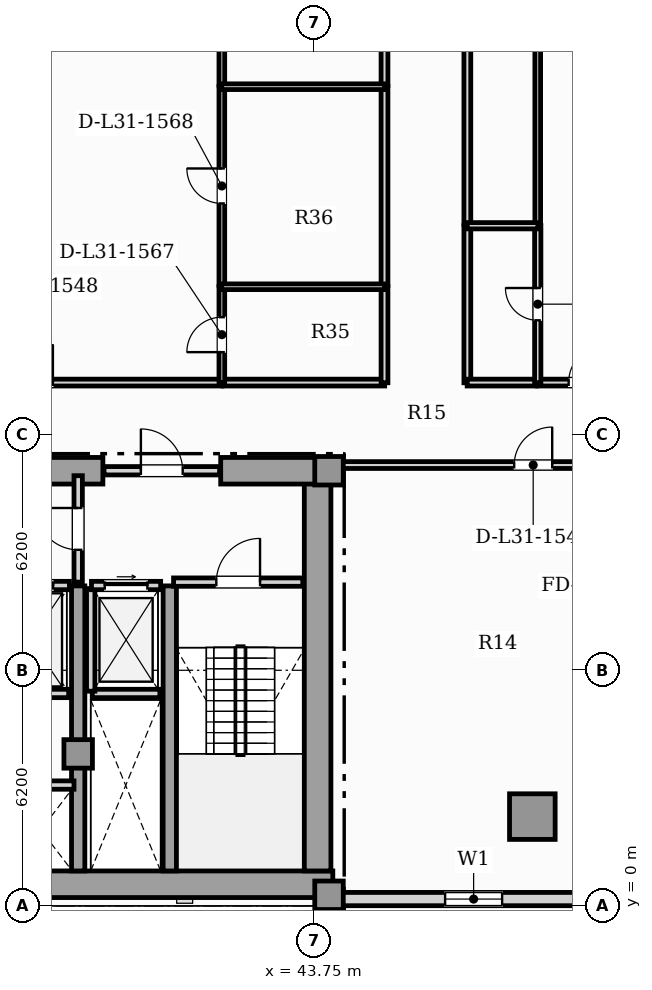
"""IFC4 building model, lengths in metres.
Left out: names, types, materials, properties, quantities, classifications, styles, units other than length and angle.
Written with IfcOpenShell. Run it as: python <this file> out.ifc"""

import sys

from ifc_helpers import new_model, si_unit, direction, frame, frame_2d, origin, origin_2d, place, context, subcontext, project, spatial, rectangle, hollow_rectangle, extrude, element, fill, save


model = new_model("IFC4")
c1 = context("Model", 3, precision=1e-05, world=origin(), true_north=direction((0.0, 1.0)))
c2 = subcontext(c1, "Body", "Model", "MODEL_VIEW")
j1 = project(units=[si_unit("LENGTHUNIT", "METRE"), si_unit("PLANEANGLEUNIT", "RADIAN")], contexts=[c1])
p1 = place(None, origin())
s1 = spatial("IfcSite", under=j1, at=p1, CompositionType="ELEMENT")
p2 = place(p1, origin())
s2 = spatial("IfcBuilding", under=s1, at=p2, CompositionType="ELEMENT")
p3 = place(p2, frame((0.0, 0.0, 127.25)))
s3 = spatial("IfcBuildingStorey", under=s2, at=p3, CompositionType="ELEMENT", Elevation=127.25)
p4 = place(p3, frame((13.25, 0.57, 0.0), z_axis=(0.0, 0.0, 1.0), x_axis=(1.0, 0.0, 0.0)))
e1 = element("IfcWall", 1, at=p4, inside=s3, PredefinedType="SHEAR", context=c2, shape_type="SweptSolid", body=[
    extrude(rectangle(XDim=31.0, YDim=0.7, at=frame_2d((15.5, 0.0))), origin(), (0.0, 0.0, 1.0), 3.6),
])
p5 = place(p3, frame((43.85, 0.92, 0.0), z_axis=(0.0, 0.0, 1.0), x_axis=(0.0, 1.0, 0.0)))
e2 = element("IfcWall", 2, at=p5, inside=s3, PredefinedType="SHEAR", context=c2, shape_type="SweptSolid", body=[
    extrude(rectangle(XDim=10.53, YDim=0.7, at=frame_2d((5.265, 0.0))), origin(), (0.0, 0.0, 1.0), 3.6),
])
p6 = place(p3, frame((30.9, 11.45, 0.0), z_axis=(0.0, 0.0, 1.0), x_axis=(1.0, 0.0, 0.0)))
e3 = element("IfcWall", 3, at=p6, inside=s3, PredefinedType="SHEAR", context=c2, shape_type="SweptSolid", body=[
    extrude(rectangle(XDim=7.3, YDim=0.7, at=frame_2d((3.65, 0.0))), origin(), (0.0, 0.0, 1.0), 3.6),
])
p7 = place(p3, frame((41.3, 11.45, 0.0), z_axis=(0.0, 0.0, 1.0), x_axis=(1.0, 0.0, 0.0)))
e4 = element("IfcWall", 4, at=p7, inside=s3, PredefinedType="SHEAR", context=c2, shape_type="SweptSolid", body=[
    extrude(rectangle(XDim=2.95, YDim=0.7, at=frame_2d((1.475, 0.0))), origin(), (0.0, 0.0, 1.0), 3.6),
])
for number, where, z_axis, x_axis in (
    (5, (37.55, 0.92, 0.0), (0.0, 0.0, 1.0), (0.0, 1.0, 0.0)),
    (6, (39.96, 0.92, 0.0), (0.0, 0.0, 1.0), (0.0, 1.0, 0.0)),
):
    element("IfcWall", number, at=place(p3, frame(where, z_axis=z_axis, x_axis=x_axis)), inside=s3, PredefinedType="SHEAR", context=c2, shape_type="SweptSolid", body=[
        extrude(rectangle(XDim=7.5, YDim=0.35, at=frame_2d((3.75, 0.0))), origin(), (0.0, 0.0, 1.0), 3.6),
    ])
for number, where, z_axis, x_axis in (
    (7, (44.15, 0.28, 0.0), (0.0, 0.0, 1.0), (1.0, 0.0, 0.0)),
    (8, (44.15, 11.45, 0.0), (0.0, 0.0, 1.0), (1.0, 0.0, 0.0)),
    (9, (37.55, 4.0, 0.0), (0.0, 0.0, 1.0), (1.0, 0.0, 0.0)),
):
    element("IfcColumn", number, at=place(p3, frame(where, z_axis=z_axis, x_axis=x_axis)), inside=s3, PredefinedType="COLUMN", context=c2, shape_type="SweptSolid", body=[
        extrude(rectangle(XDim=0.75, YDim=0.75, at=origin_2d()), origin(), (0.0, 0.0, 1.0), 3.85),
    ])
p8 = place(p3, frame((49.5, 2.35, 0.0), z_axis=(0.0, 0.0, 1.0), x_axis=(1.0, 0.0, 0.0)))
e10 = element("IfcColumn", 10, at=p8, inside=s3, PredefinedType="USERDEFINED", context=c2, shape_type="SweptSolid", body=[
    extrude(hollow_rectangle(XDim=1.2, YDim=1.2, WallThickness=0.07, at=origin_2d()), origin(), (0.0, 0.0, 1.0), 3.85),
])
p9 = place(p3, frame((44.25, 0.18, 0.0), z_axis=(0.0, 0.0, 1.0), x_axis=(1.0, 0.0, 0.0)))
e11 = element("IfcWall", 11, at=p9, inside=s3, PredefinedType="SOLIDWALL", context=c2, shape_type="SweptSolid", body=[
    extrude(rectangle(XDim=7.41, YDim=0.35, at=frame_2d((3.705, 0.0))), origin(), (0.0, 0.0, 1.0), 3.6),
])
p10 = place(p9, frame((2.955, 0.0, 0.9)))
e12 = element("IfcOpeningElement", 12, at=p10, cuts=e11, PredefinedType="OPENING", context=c2, shape_type="SweptSolid", body=[
    extrude(rectangle(XDim=1.5, YDim=1.95, at=frame_2d((0.75, 0.975))), frame((0.0, 0.185, 0.0), z_axis=(0.0, -1.0, 0.0), x_axis=(1.0, 0.0, 0.0)), (0.0, 0.0, 1.0), 0.37),
])
p11 = place(p3, frame((37.92, 5.59, 0.0), z_axis=(0.0, 0.0, 1.0), x_axis=(1.0, 0.0, 0.0)))
e13 = element("IfcWall", 13, at=p11, inside=s3, PredefinedType="SOLIDWALL", context=c2, shape_type="SweptSolid", body=[
    extrude(rectangle(XDim=1.78, YDim=0.22, at=frame_2d((0.89, 0.0))), origin(), (0.0, 0.0, 1.0), 3.6),
])
p12 = place(p3, frame((37.88, 5.65, 0.0), z_axis=(0.0, 0.0, 1.0), x_axis=(0.0, 1.0, 0.0)))
e14 = element("IfcWall", 14, at=p12, inside=s3, PredefinedType="SOLIDWALL", context=c2, shape_type="SweptSolid", body=[
    extrude(rectangle(XDim=2.7, YDim=0.22, at=frame_2d((1.35, 0.0))), origin(), (0.0, 0.0, 1.0), 3.6),
])
p13 = place(p3, frame((37.9, 8.43, 0.0), z_axis=(0.0, 0.0, 1.0), x_axis=(1.0, 0.0, 0.0)))
e15 = element("IfcWall", 15, at=p13, inside=s3, PredefinedType="SOLIDWALL", context=c2, shape_type="SweptSolid", body=[
    extrude(rectangle(XDim=1.82, YDim=0.22, at=frame_2d((0.91, 0.0))), origin(), (0.0, 0.0, 1.0), 3.6),
])
p14 = place(p13, frame((0.35, 0.0, 0.0)))
e16 = element("IfcOpeningElement", 16, at=p14, cuts=e15, PredefinedType="OPENING", context=c2, shape_type="SweptSolid", body=[
    extrude(rectangle(XDim=1.12, YDim=2.25, at=frame_2d((0.56, 1.125))), frame((0.0, 0.12, 0.0), z_axis=(0.0, -1.0, 0.0), x_axis=(1.0, 0.0, 0.0)), (0.0, 0.0, 1.0), 0.24),
])
p15 = place(p3, frame((35.3, 5.59, 0.0), z_axis=(0.0, 0.0, 1.0), x_axis=(1.0, 0.0, 0.0)))
e17 = element("IfcWall", 17, at=p15, inside=s3, PredefinedType="SOLIDWALL", context=c2, shape_type="SweptSolid", body=[
    extrude(rectangle(XDim=2.0, YDim=0.22, at=frame_2d((1.0, 0.0))), origin(), (0.0, 0.0, 1.0), 3.6),
])
p16 = place(p3, frame((35.28, 8.43, 0.0), z_axis=(0.0, 0.0, 1.0), x_axis=(1.0, 0.0, 0.0)))
e18 = element("IfcWall", 18, at=p16, inside=s3, PredefinedType="SOLIDWALL", context=c2, shape_type="SweptSolid", body=[
    extrude(rectangle(XDim=2.04, YDim=0.22, at=frame_2d((1.02, 0.0))), origin(), (0.0, 0.0, 1.0), 3.6),
])
p17 = place(p16, frame((0.43, 0.0, 0.0)))
e19 = element("IfcOpeningElement", 19, at=p17, cuts=e18, PredefinedType="OPENING", context=c2, shape_type="SweptSolid", body=[
    extrude(rectangle(XDim=1.18, YDim=2.2, at=frame_2d((0.59, 1.1))), frame((0.0, 0.12, 0.0), z_axis=(0.0, -1.0, 0.0), x_axis=(1.0, 0.0, 0.0)), (0.0, 0.0, 1.0), 0.24),
])
p18 = place(p3, frame((35.7, 3.18, 0.0), z_axis=(0.0, 0.0, 1.0), x_axis=(1.0, 0.0, 0.0)))
e20 = element("IfcWall", 20, at=p18, inside=s3, PredefinedType="SOLIDWALL", context=c2, shape_type="SweptSolid", body=[
    extrude(rectangle(XDim=1.74, YDim=0.22, at=frame_2d((0.87, 0.0))), origin(), (0.0, 0.0, 1.0), 3.6),
])
p19 = place(p3, frame((40.06, 8.52, 0.0), z_axis=(0.0, 0.0, 1.0), x_axis=(1.0, 0.0, 0.0)))
e21 = element("IfcWall", 21, at=p19, inside=s3, PredefinedType="SOLIDWALL", context=c2, shape_type="SweptSolid", body=[
    extrude(rectangle(XDim=3.4, YDim=0.22, at=frame_2d((1.7, 0.0))), origin(), (0.0, 0.0, 1.0), 3.6),
])
p20 = place(p19, frame((1.125, 0.0, 0.0)))
e22 = element("IfcOpeningElement", 22, at=p20, cuts=e21, PredefinedType="OPENING", context=c2, shape_type="SweptSolid", body=[
    extrude(rectangle(XDim=1.15, YDim=2.2, at=frame_2d((0.575, 1.1))), frame((0.0, 0.12, 0.0), z_axis=(0.0, -1.0, 0.0), x_axis=(1.0, 0.0, 0.0)), (0.0, 0.0, 1.0), 0.24),
])
p21 = place(p3, frame((37.55, 8.52, 0.0), z_axis=(0.0, 0.0, 1.0), x_axis=(0.0, 1.0, 0.0)))
e23 = element("IfcWall", 23, at=p21, inside=s3, PredefinedType="SOLIDWALL", context=c2, shape_type="SweptSolid", body=[
    extrude(rectangle(XDim=2.8, YDim=0.22, at=frame_2d((1.4, 0.0))), origin(), (0.0, 0.0, 1.0), 3.055),
])
p22 = place(p21, frame((0.85, 0.0, 0.0)))
e24 = element("IfcOpeningElement", 24, at=p22, cuts=e23, PredefinedType="OPENING", context=c2, shape_type="SweptSolid", body=[
    extrude(rectangle(XDim=1.1, YDim=2.2, at=frame_2d((0.55, 1.1))), frame((0.0, 0.12, 0.0), z_axis=(0.0, -1.0, 0.0), x_axis=(1.0, 0.0, 0.0)), (0.0, 0.0, 1.0), 0.24),
])
p23 = place(p3, frame((38.23, 11.45, 0.0), z_axis=(0.0, 0.0, 1.0), x_axis=(1.0, 0.0, 0.0)))
e25 = element("IfcWall", 25, at=p23, inside=s3, PredefinedType="SOLIDWALL", context=c2, shape_type="SweptSolid", body=[
    extrude(rectangle(XDim=3.04, YDim=0.22, at=frame_2d((1.52, 0.0))), origin(), (0.0, 0.0, 1.0), 3.6),
])
p24 = place(p23, frame((0.97, 0.0, 0.0)))
e26 = element("IfcOpeningElement", 26, at=p24, cuts=e25, PredefinedType="OPENING", context=c2, shape_type="SweptSolid", body=[
    extrude(rectangle(XDim=1.1, YDim=2.2, at=frame_2d((0.55, 1.1))), frame((0.0, 0.12, 0.0), z_axis=(0.0, -1.0, 0.0), x_axis=(1.0, 0.0, 0.0)), (0.0, 0.0, 1.0), 0.24),
])
p25 = place(p3, frame((44.355, 11.6, 0.0), z_axis=(0.0, 0.0, 1.0), x_axis=(1.0, 0.0, 0.0)))
e27 = element("IfcWall", 27, at=p25, inside=s3, PredefinedType="PARTITIONING", context=c2, shape_type="SweptSolid", body=[
    extrude(rectangle(XDim=10.335, YDim=0.18, at=frame_2d((5.167, 0.0))), origin(), (0.0, 0.0, 1.0), 3.6),
])
p26 = place(p25, frame((4.667, 0.0, 0.0)))
e28 = element("IfcOpeningElement", 28, at=p26, cuts=e27, PredefinedType="OPENING", context=c2, shape_type="SweptSolid", body=[
    extrude(rectangle(XDim=1.0, YDim=2.15, at=frame_2d((0.5, 1.075))), frame((0.0, 0.1, 0.0), z_axis=(0.0, -1.0, 0.0), x_axis=(1.0, 0.0, 0.0)), (0.0, 0.0, 1.0), 0.2),
])
p27 = place(p3, frame((49.637, 13.77, 0.0), z_axis=(0.0, 0.0, 1.0), x_axis=(1.0, 0.0, 0.0)))
e29 = element("IfcWall", 29, at=p27, inside=s3, PredefinedType="PARTITIONING", context=c2, shape_type="SweptSolid", body=[
    extrude(rectangle(XDim=2.636, YDim=0.18, at=frame_2d((1.318, 0.0))), origin(), (0.0, 0.0, 1.0), 3.6),
])
p28 = place(p27, frame((0.818, 0.0, 0.0)))
e30 = element("IfcOpeningElement", 30, at=p28, cuts=e29, PredefinedType="OPENING", context=c2, shape_type="SweptSolid", body=[
    extrude(rectangle(XDim=1.0, YDim=2.15, at=frame_2d((0.5, 1.075))), frame((0.0, 0.1, 0.0), z_axis=(0.0, -1.0, 0.0), x_axis=(1.0, 0.0, 0.0)), (0.0, 0.0, 1.0), 0.2),
])
p29 = place(p3, frame((47.79, 13.765, 0.0), z_axis=(0.0, 0.0, 1.0), x_axis=(0.0, 1.0, 0.0)))
e31 = element("IfcWall", 31, at=p29, inside=s3, PredefinedType="PARTITIONING", context=c2, shape_type="SweptSolid", body=[
    extrude(rectangle(XDim=4.136, YDim=0.18, at=frame_2d((2.068, 0.0))), origin(), (0.0, 0.0, 1.0), 3.6),
])
p30 = place(p3, frame((47.785, 13.77, 0.0), z_axis=(0.0, 0.0, 1.0), x_axis=(1.0, 0.0, 0.0)))
e32 = element("IfcWall", 32, at=p30, inside=s3, PredefinedType="PARTITIONING", context=c2, shape_type="SweptSolid", body=[
    extrude(rectangle(XDim=1.823, YDim=0.18, at=frame_2d((0.911, 0.0))), origin(), (0.0, 0.0, 1.0), 3.6),
])
p31 = place(p3, frame((47.79, 17.931, 0.0), z_axis=(0.0, 0.0, 1.0), x_axis=(0.0, 1.0, 0.0)))
e33 = element("IfcWall", 33, at=p31, inside=s3, PredefinedType="PARTITIONING", context=c2, shape_type="SweptSolid", body=[
    extrude(rectangle(XDim=9.964, YDim=0.18, at=frame_2d((4.982, 0.0))), origin(), (0.0, 0.0, 1.0), 3.6),
])
p32 = place(p3, frame((31.435, 13.77, 0.0), z_axis=(0.0, 0.0, 1.0), x_axis=(1.0, 0.0, 0.0)))
e34 = element("IfcWall", 34, at=p32, inside=s3, PredefinedType="PARTITIONING", context=c2, shape_type="SweptSolid", body=[
    extrude(rectangle(XDim=9.9, YDim=0.18, at=frame_2d((4.95, 0.0))), origin(), (0.0, 0.0, 1.0), 3.6),
])
p33 = place(p32, frame((4.45, 0.0, 0.0)))
e35 = element("IfcOpeningElement", 35, at=p33, cuts=e34, PredefinedType="OPENING", context=c2, shape_type="SweptSolid", body=[
    extrude(rectangle(XDim=1.0, YDim=2.15, at=frame_2d((0.5, 1.075))), frame((0.0, 0.1, 0.0), z_axis=(0.0, -1.0, 0.0), x_axis=(1.0, 0.0, 0.0)), (0.0, 0.0, 1.0), 0.2),
])
p34 = place(p3, frame((41.365, 13.77, 0.0), z_axis=(0.0, 0.0, 1.0), x_axis=(1.0, 0.0, 0.0)))
e36 = element("IfcWall", 36, at=p34, inside=s3, PredefinedType="PARTITIONING", context=c2, shape_type="SweptSolid", body=[
    extrude(rectangle(XDim=4.25, YDim=0.18, at=frame_2d((2.125, 0.0))), origin(), (0.0, 0.0, 1.0), 3.6),
])
p35 = place(p3, frame((45.61, 13.765, 0.0), z_axis=(0.0, 0.0, 1.0), x_axis=(0.0, 1.0, 0.0)))
e37 = element("IfcWall", 37, at=p35, inside=s3, PredefinedType="PARTITIONING", context=c2, shape_type="SweptSolid", body=[
    extrude(rectangle(XDim=2.531, YDim=0.18, at=frame_2d((1.266, 0.0))), origin(), (0.0, 0.0, 1.0), 3.6),
])
for number, where, z_axis, x_axis in (
    (38, (45.61, 16.326, 0.0), (0.0, 0.0, 1.0), (0.0, 1.0, 0.0)),
    (39, (45.61, 21.59, 0.0), (0.0, 0.0, 1.0), (0.0, 1.0, 0.0)),
):
    element("IfcWall", number, at=place(p3, frame(where, z_axis=z_axis, x_axis=x_axis)), inside=s3, PredefinedType="PARTITIONING", context=c2, shape_type="SweptSolid", body=[
        extrude(rectangle(XDim=5.234, YDim=0.18, at=frame_2d((2.617, 0.0))), origin(), (0.0, 0.0, 1.0), 3.6),
    ])
p36 = place(p3, frame((49.642, 13.765, 0.0), z_axis=(0.0, 0.0, 1.0), x_axis=(0.0, 1.0, 0.0)))
e40 = element("IfcWall", 40, at=p36, inside=s3, PredefinedType="PLUMBINGWALL", context=c2, shape_type="SweptSolid", body=[
    extrude(rectangle(XDim=4.136, YDim=0.165, at=frame_2d((2.068, 0.0))), origin(), (0.0, 0.0, 1.0), 3.055),
])
p37 = place(p36, frame((1.643, 0.0, 0.0)))
e41 = element("IfcOpeningElement", 41, at=p37, cuts=e40, PredefinedType="OPENING", context=c2, shape_type="SweptSolid", body=[
    extrude(rectangle(XDim=0.85, YDim=2.1, at=frame_2d((0.425, 1.05))), frame((0.0, 0.093, 0.0), z_axis=(0.0, -1.0, 0.0), x_axis=(1.0, 0.0, 0.0)), (0.0, 0.0, 1.0), 0.185),
])
p38 = place(p3, frame((49.642, 17.931, 0.0), z_axis=(0.0, 0.0, 1.0), x_axis=(0.0, 1.0, 0.0)))
e42 = element("IfcWall", 42, at=p38, inside=s3, PredefinedType="PARTITIONING", context=c2, shape_type="SweptSolid", body=[
    extrude(rectangle(XDim=15.573, YDim=0.15, at=frame_2d((7.787, 0.0))), origin(), (0.0, 0.0, 1.0), 3.055),
])
p39 = place(p38, frame((7.327, 0.0, 0.0)))
e43 = element("IfcOpeningElement", 43, at=p39, cuts=e42, PredefinedType="OPENING", context=c2, shape_type="SweptSolid", body=[
    extrude(rectangle(XDim=0.92, YDim=2.1, at=frame_2d((0.46, 1.05))), frame((0.0, 0.085, 0.0), z_axis=(0.0, -1.0, 0.0), x_axis=(1.0, 0.0, 0.0)), (0.0, 0.0, 1.0), 0.17),
])
p40 = place(p3, frame((47.785, 17.896, 0.0), z_axis=(0.0, 0.0, 1.0), x_axis=(1.0, 0.0, 0.0)))
e44 = element("IfcWall", 44, at=p40, inside=s3, PredefinedType="PLUMBINGWALL", context=c2, shape_type="SweptSolid", body=[
    extrude(rectangle(XDim=1.863, YDim=0.165, at=frame_2d((0.931, 0.0))), origin(), (0.0, 0.0, 1.0), 3.6),
])
p41 = place(p3, frame((41.33, 13.765, 0.0), z_axis=(0.0, 0.0, 1.0), x_axis=(0.0, 1.0, 0.0)))
e45 = element("IfcWall", 45, at=p41, inside=s3, PredefinedType="PARTITIONING", context=c2, shape_type="SweptSolid", body=[
    extrude(rectangle(XDim=2.531, YDim=0.15, at=frame_2d((1.266, 0.0))), origin(), (0.0, 0.0, 1.0), 3.6),
])
p42 = place(p41, frame((0.806, 0.0, 0.0)))
e46 = element("IfcOpeningElement", 46, at=p42, cuts=e45, PredefinedType="OPENING", context=c2, shape_type="SweptSolid", body=[
    extrude(rectangle(XDim=0.92, YDim=2.1, at=frame_2d((0.46, 1.05))), frame((0.0, 0.085, 0.0), z_axis=(0.0, -1.0, 0.0), x_axis=(1.0, 0.0, 0.0)), (0.0, 0.0, 1.0), 0.17),
])
p43 = place(p3, frame((41.33, 16.326, 0.0), z_axis=(0.0, 0.0, 1.0), x_axis=(0.0, 1.0, 0.0)))
e47 = element("IfcWall", 47, at=p43, inside=s3, PredefinedType="PARTITIONING", context=c2, shape_type="SweptSolid", body=[
    extrude(rectangle(XDim=5.234, YDim=0.15, at=frame_2d((2.617, 0.0))), origin(), (0.0, 0.0, 1.0), 3.6),
])
p44 = place(p43, frame((2.157, 0.0, 0.0)))
e48 = element("IfcOpeningElement", 48, at=p44, cuts=e47, PredefinedType="OPENING", context=c2, shape_type="SweptSolid", body=[
    extrude(rectangle(XDim=0.92, YDim=2.1, at=frame_2d((0.46, 1.05))), frame((0.0, 0.085, 0.0), z_axis=(0.0, -1.0, 0.0), x_axis=(1.0, 0.0, 0.0)), (0.0, 0.0, 1.0), 0.17),
])
p45 = place(p3, frame((41.33, 21.59, 0.0), z_axis=(0.0, 0.0, 1.0), x_axis=(0.0, 1.0, 0.0)))
e49 = element("IfcWall", 49, at=p45, inside=s3, PredefinedType="PARTITIONING", context=c2, shape_type="SweptSolid", body=[
    extrude(rectangle(XDim=5.234, YDim=0.15, at=frame_2d((2.617, 0.0))), origin(), (0.0, 0.0, 1.0), 3.6),
])
p46 = place(p45, frame((2.157, 0.0, 0.0)))
e50 = element("IfcOpeningElement", 50, at=p46, cuts=e49, PredefinedType="OPENING", context=c2, shape_type="SweptSolid", body=[
    extrude(rectangle(XDim=0.92, YDim=2.1, at=frame_2d((0.46, 1.05))), frame((0.0, 0.085, 0.0), z_axis=(0.0, -1.0, 0.0), x_axis=(1.0, 0.0, 0.0)), (0.0, 0.0, 1.0), 0.17),
])
for number, where, z_axis, x_axis in (
    (51, (41.325, 16.292, 0.0), (0.0, 0.0, 1.0), (1.0, 0.0, 0.0)),
    (52, (41.325, 21.555, 0.0), (0.0, 0.0, 1.0), (1.0, 0.0, 0.0)),
):
    element("IfcWall", number, at=place(p3, frame(where, z_axis=z_axis, x_axis=x_axis)), inside=s3, PredefinedType="PARTITIONING", context=c2, shape_type="SweptSolid", body=[
        extrude(rectangle(XDim=4.29, YDim=0.15, at=frame_2d((2.145, 0.0))), origin(), (0.0, 0.0, 1.0), 3.6),
    ])
p47 = place(p10, origin())
e53 = element("IfcWindow", 53, at=p47, inside=s3, PartitioningType="SINGLE_PANEL", PredefinedType="WINDOW", context=c2, shape_type="SweptSolid", body=[
    extrude(rectangle(XDim=1.5, YDim=1.95, at=frame_2d((0.75, 0.975))), frame((0.0, 0.03, 0.0), z_axis=(0.0, -1.0, 0.0), x_axis=(1.0, 0.0, 0.0)), (0.0, 0.0, 1.0), 0.06),
])
fill(e12, e53)
p48 = place(p14, origin())
e54 = element("IfcDoor", 54, at=p48, inside=s3, OperationType="SLIDING_TO_RIGHT", PredefinedType="DOOR", context=c2, shape_type="SweptSolid", body=[
    extrude(rectangle(XDim=1.12, YDim=2.25, at=frame_2d((0.56, 1.125))), frame((0.0, 0.025, 0.0), z_axis=(0.0, -1.0, 0.0), x_axis=(1.0, 0.0, 0.0)), (0.0, 0.0, 1.0), 0.05),
])
fill(e16, e54)
p49 = place(p17, origin())
e55 = element("IfcDoor", 55, at=p49, inside=s3, OperationType="SLIDING_TO_LEFT", PredefinedType="DOOR", context=c2, shape_type="SweptSolid", body=[
    extrude(rectangle(XDim=1.18, YDim=2.2, at=frame_2d((0.59, 1.1))), frame((0.0, 0.025, 0.0), z_axis=(0.0, -1.0, 0.0), x_axis=(1.0, 0.0, 0.0)), (0.0, 0.0, 1.0), 0.05),
])
fill(e19, e55)
p50 = place(p20, origin())
e56 = element("IfcDoor", 56, at=p50, inside=s3, OperationType="SINGLE_SWING_RIGHT", PredefinedType="DOOR", context=c2, shape_type="SweptSolid", body=[
    extrude(rectangle(XDim=1.15, YDim=2.2, at=frame_2d((0.575, 1.1))), frame((0.0, 0.025, 0.0), z_axis=(0.0, -1.0, 0.0), x_axis=(1.0, 0.0, 0.0)), (0.0, 0.0, 1.0), 0.05),
])
fill(e22, e56)
p51 = place(p22, origin())
e57 = element("IfcDoor", 57, at=p51, inside=s3, OperationType="SINGLE_SWING_RIGHT", PredefinedType="DOOR", context=c2, shape_type="SweptSolid", body=[
    extrude(rectangle(XDim=1.1, YDim=2.2, at=frame_2d((0.55, 1.1))), frame((0.0, 0.025, 0.0), z_axis=(0.0, -1.0, 0.0), x_axis=(1.0, 0.0, 0.0)), (0.0, 0.0, 1.0), 0.05),
])
fill(e24, e57)
p52 = place(p24, origin())
e58 = element("IfcDoor", 58, at=p52, inside=s3, OperationType="SINGLE_SWING_LEFT", PredefinedType="DOOR", context=c2, shape_type="SweptSolid", body=[
    extrude(rectangle(XDim=1.1, YDim=2.2, at=frame_2d((0.55, 1.1))), frame((0.0, 0.025, 0.0), z_axis=(0.0, -1.0, 0.0), x_axis=(1.0, 0.0, 0.0)), (0.0, 0.0, 1.0), 0.05),
])
fill(e26, e58)
p53 = place(p26, origin())
e59 = element("IfcDoor", 59, at=p53, inside=s3, OperationType="SINGLE_SWING_RIGHT", PredefinedType="DOOR", context=c2, shape_type="SweptSolid", body=[
    extrude(rectangle(XDim=1.0, YDim=2.15, at=frame_2d((0.5, 1.075))), frame((0.0, 0.025, 0.0), z_axis=(0.0, -1.0, 0.0), x_axis=(1.0, 0.0, 0.0)), (0.0, 0.0, 1.0), 0.05),
])
fill(e28, e59)
p54 = place(p28, origin())
e60 = element("IfcDoor", 60, at=p54, inside=s3, OperationType="SINGLE_SWING_RIGHT", PredefinedType="DOOR", context=c2, shape_type="SweptSolid", body=[
    extrude(rectangle(XDim=1.0, YDim=2.15, at=frame_2d((0.5, 1.075))), frame((0.0, 0.025, 0.0), z_axis=(0.0, -1.0, 0.0), x_axis=(1.0, 0.0, 0.0)), (0.0, 0.0, 1.0), 0.05),
])
fill(e30, e60)
p55 = place(p33, origin())
e61 = element("IfcDoor", 61, at=p55, inside=s3, OperationType="SINGLE_SWING_RIGHT", PredefinedType="DOOR", context=c2, shape_type="SweptSolid", body=[
    extrude(rectangle(XDim=1.0, YDim=2.15, at=frame_2d((0.5, 1.075))), frame((0.0, 0.025, 0.0), z_axis=(0.0, -1.0, 0.0), x_axis=(1.0, 0.0, 0.0)), (0.0, 0.0, 1.0), 0.05),
])
fill(e35, e61)
p56 = place(p37, origin())
e62 = element("IfcDoor", 62, at=p56, inside=s3, OperationType="SINGLE_SWING_RIGHT", PredefinedType="DOOR", context=c2, shape_type="SweptSolid", body=[
    extrude(rectangle(XDim=0.85, YDim=2.1, at=frame_2d((0.425, 1.05))), frame((0.0, 0.025, 0.0), z_axis=(0.0, -1.0, 0.0), x_axis=(1.0, 0.0, 0.0)), (0.0, 0.0, 1.0), 0.05),
])
fill(e41, e62)
p57 = place(p42, origin())
e63 = element("IfcDoor", 63, at=p57, inside=s3, OperationType="SINGLE_SWING_LEFT", PredefinedType="DOOR", context=c2, shape_type="SweptSolid", body=[
    extrude(rectangle(XDim=0.92, YDim=2.1, at=frame_2d((0.46, 1.05))), frame((0.0, 0.025, 0.0), z_axis=(0.0, -1.0, 0.0), x_axis=(1.0, 0.0, 0.0)), (0.0, 0.0, 1.0), 0.05),
])
fill(e46, e63)
p58 = place(p44, origin())
e64 = element("IfcDoor", 64, at=p58, inside=s3, OperationType="SINGLE_SWING_RIGHT", PredefinedType="DOOR", context=c2, shape_type="SweptSolid", body=[
    extrude(rectangle(XDim=0.92, YDim=2.1, at=frame_2d((0.46, 1.05))), frame((0.0, 0.025, 0.0), z_axis=(0.0, -1.0, 0.0), x_axis=(1.0, 0.0, 0.0)), (0.0, 0.0, 1.0), 0.05),
])
fill(e48, e64)
save(model, sys.argv[1])
